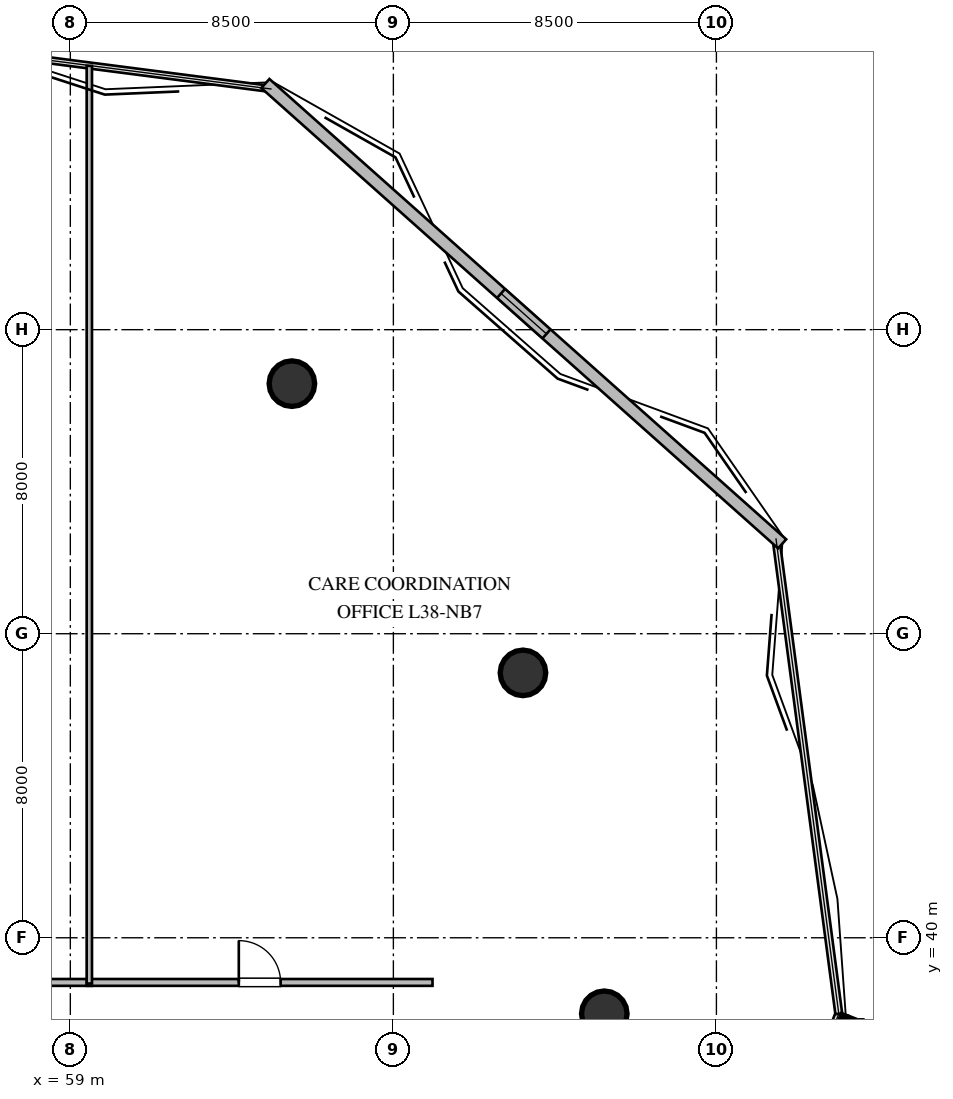
"""IFC4 building model, lengths in metres.
Left out: names, types, materials, properties, quantities, classifications, styles, units other than length and angle.
Written with IfcOpenShell. Run it as: python <this file> out.ifc"""

import sys

from ifc_helpers import new_model, si_unit, direction, frame, frame_2d, origin, origin_2d, place, context, subcontext, project, spatial, rectangle, circle, extrude, element, fill, save


model = new_model("IFC4")
c1 = context("Model", 3, precision=1e-05, world=origin(), true_north=direction((0.0, 1.0)))
c2 = subcontext(c1, "Body", "Model", "MODEL_VIEW")
j1 = project(units=[si_unit("LENGTHUNIT", "METRE"), si_unit("PLANEANGLEUNIT", "RADIAN")], contexts=[c1])
p1 = place(None, origin())
s1 = spatial("IfcSite", under=j1, at=p1, CompositionType="ELEMENT")
p2 = place(p1, origin())
s2 = spatial("IfcBuilding", under=s1, at=p2, CompositionType="ELEMENT")
p3 = place(p2, frame((0.0, 0.0, 145.8)))
s3 = spatial("IfcBuildingStorey", under=s2, at=p3, CompositionType="ELEMENT", Elevation=145.8)
for number, where, z_axis, x_axis in (
    (1, (73.05, 38.0, 0.0), (0.0, 0.0, 1.0), (1.0, 0.0, 0.0)),
    (2, (70.91, 46.97, 0.0), (0.0, 0.0, 1.0), (1.0, 0.0, 0.0)),
    (3, (64.83, 54.58, 0.0), (0.0, 0.0, 1.0), (1.0, 0.0, 0.0)),
):
    element("IfcColumn", number, at=place(p3, frame(where, z_axis=z_axis, x_axis=x_axis)), inside=s3, PredefinedType="COLUMN", context=c2, shape_type="SweptSolid", body=[
        extrude(circle(Radius=0.6, at=origin_2d()), origin(), (0.0, 0.0, 1.0), 3.6),
    ])
p4 = place(p3, frame((64.132, 62.477, 0.0), z_axis=(0.0, 0.0, 1.0), x_axis=(0.746726187299, -0.665131566836, 0.0)))
e4 = element("IfcWall", 4, at=p4, inside=s3, PredefinedType="STANDARD", context=c2, shape_type="SweptSolid", body=[
    extrude(rectangle(XDim=18.21, YDim=0.32, at=frame_2d((9.105, 0.0))), origin(), (0.0, 0.0, 1.0), 3.36),
])
p5 = place(p4, frame((8.305, 0.0, 1.05)))
e5 = element("IfcOpeningElement", 5, at=p5, cuts=e4, PredefinedType="OPENING", context=c2, shape_type="SweptSolid", body=[
    extrude(rectangle(XDim=1.6, YDim=1.5, at=frame_2d((0.8, 0.75))), frame((0.0, 0.17, 0.0), z_axis=(0.0, -1.0, 0.0), x_axis=(1.0, 0.0, 0.0)), (0.0, 0.0, 1.0), 0.34),
])
p6 = place(p3, frame((55.185, 38.825, 0.0), z_axis=(0.0, 0.0, 1.0), x_axis=(1.0, 0.0, 0.0)))
e6 = element("IfcWall", 6, at=p6, inside=s3, PredefinedType="PARTITIONING", context=c2, shape_type="SweptSolid", body=[
    extrude(rectangle(XDim=4.38, YDim=0.18, at=frame_2d((2.19, 0.0))), origin(), (0.0, 0.0, 1.0), 3.36),
])
p7 = place(p6, frame((1.64, 0.0, 0.0)))
e7 = element("IfcOpeningElement", 7, at=p7, cuts=e6, PredefinedType="OPENING", context=c2, shape_type="SweptSolid", body=[
    extrude(rectangle(XDim=1.1, YDim=2.1, at=frame_2d((0.55, 1.05))), frame((0.0, 0.1, 0.0), z_axis=(0.0, -1.0, 0.0), x_axis=(1.0, 0.0, 0.0)), (0.0, 0.0, 1.0), 0.2),
])
p8 = place(p3, frame((59.435, 38.825, 0.0), z_axis=(0.0, 0.0, 1.0), x_axis=(1.0, 0.0, 0.0)))
e8 = element("IfcWall", 8, at=p8, inside=s3, PredefinedType="PARTITIONING", context=c2, shape_type="SweptSolid", body=[
    extrude(rectangle(XDim=9.095, YDim=0.18, at=frame_2d((4.547, 0.0))), origin(), (0.0, 0.0, 1.0), 3.36),
])
p9 = place(p8, frame((3.998, 0.0, 0.0)))
e9 = element("IfcOpeningElement", 9, at=p9, cuts=e8, PredefinedType="OPENING", context=c2, shape_type="SweptSolid", body=[
    extrude(rectangle(XDim=1.1, YDim=2.1, at=frame_2d((0.55, 1.05))), frame((0.0, 0.1, 0.0), z_axis=(0.0, -1.0, 0.0), x_axis=(1.0, 0.0, 0.0)), (0.0, 0.0, 1.0), 0.2),
])
p10 = place(p3, frame((59.5, 62.941, 0.0), z_axis=(0.0, 0.0, 1.0), x_axis=(0.0, -1.0, 0.0)))
e10 = element("IfcWall", 10, at=p10, inside=s3, PredefinedType="PARTITIONING", context=c2, shape_type="SweptSolid", body=[
    extrude(rectangle(XDim=24.146, YDim=0.14, at=frame_2d((12.073, 0.0))), origin(), (0.0, 0.0, 1.0), 2.996),
])
p11 = place(p5, origin())
e11 = element("IfcWindow", 11, at=p11, inside=s3, PartitioningType="SINGLE_PANEL", PredefinedType="WINDOW", context=c2, shape_type="SweptSolid", body=[
    extrude(rectangle(XDim=1.6, YDim=1.5, at=frame_2d((0.8, 0.75))), frame((0.0, 0.03, 0.0), z_axis=(0.0, -1.0, 0.0), x_axis=(1.0, 0.0, 0.0)), (0.0, 0.0, 1.0), 0.06),
])
fill(e5, e11)
p12 = place(p9, origin())
e12 = element("IfcDoor", 12, at=p12, inside=s3, OperationType="SINGLE_SWING_LEFT", PredefinedType="DOOR", context=c2, shape_type="SweptSolid", body=[
    extrude(rectangle(XDim=1.1, YDim=2.1, at=frame_2d((0.55, 1.05))), frame((0.0, 0.025, 0.0), z_axis=(0.0, -1.0, 0.0), x_axis=(1.0, 0.0, 0.0)), (0.0, 0.0, 1.0), 0.05),
])
fill(e9, e12)
save(model, sys.argv[1])
